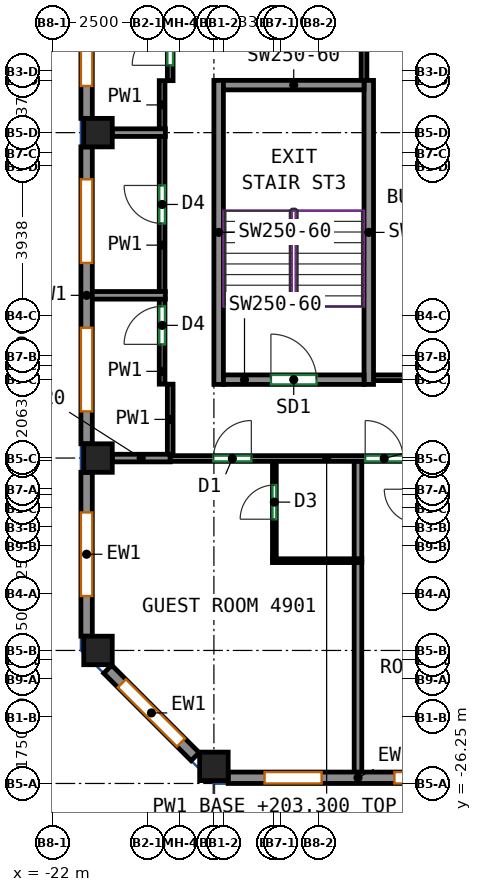
"""IFC4 building model, lengths in metres.
Left out: names, types, materials, properties, quantities, classifications, styles, units other than length and angle.
Written with IfcOpenShell. Run it as: python <this file> out.ifc"""

import sys

from ifc_helpers import new_model, si_unit, direction, frame, frame_2d, origin, origin_2d, place, context, subcontext, project, spatial, rectangle, extrude, source, transform, mapped, element, fill, save


model = new_model("IFC4")
c1 = context("Model", 3, precision=1e-05, world=origin(), true_north=direction((0.0, 1.0)))
c2 = subcontext(c1, "Body", "Model", "MODEL_VIEW")
j1 = project(units=[si_unit("LENGTHUNIT", "METRE"), si_unit("PLANEANGLEUNIT", "RADIAN")], contexts=[c1])
p1 = place(None, origin())
s1 = spatial("IfcSite", under=j1, at=p1, CompositionType="ELEMENT")
p2 = place(p1, origin())
s2 = spatial("IfcBuilding", under=s1, at=p2, CompositionType="ELEMENT")
p3 = place(p2, frame((0.0, 0.0, 203.3)))
s3 = spatial("IfcBuildingStorey", under=s2, at=p3, CompositionType="ELEMENT", Elevation=203.3)
m1 = source(origin(), c2, "Body", "SweptSolid", [
    extrude(rectangle(XDim=0.75, YDim=0.75, at=origin_2d()), origin(), (0.0, 0.0, 1.0), 3.12),
])
for number, where, z_axis, x_axis in (
    (1, (-20.8, -22.75, 0.0), (0.0, 0.0, 1.0), (1.0, 0.0, 0.0)),
    (2, (-20.8, -17.688, 0.0), (0.0, 0.0, 1.0), (1.0, 0.0, 0.0)),
    (3, (-20.8, -9.125, 0.0), (0.0, 0.0, 1.0), (1.0, 0.0, 0.0)),
    (4, (-17.75, -25.8, 0.0), (0.0, 0.0, 1.0), (1.0, 0.0, 0.0)),
):
    element("IfcColumn", number, at=place(p3, frame(where, z_axis=z_axis, x_axis=x_axis)), inside=s3, PredefinedType="COLUMN", context=c2, shape_type="MappedRepresentation", body=[
        mapped(m1, transform((0.0, 0.0, 0.0))),
    ])
m2 = source(origin(), c2, "Body", "SweptSolid", [
    extrude(rectangle(XDim=8.0, YDim=0.25, at=frame_2d((4.0, 0.0))), origin(), (0.0, 0.0, 1.0), 3.12),
])
for number, where, z_axis, x_axis in (
    (5, (-17.625, -15.75, 0.0), (0.0, 0.0, 1.0), (0.0, 1.0, 0.0)),
    (6, (-13.675, -15.75, 0.0), (0.0, 0.0, 1.0), (0.0, 1.0, 0.0)),
):
    element("IfcWall", number, at=place(p3, frame(where, z_axis=z_axis, x_axis=x_axis)), inside=s3, PredefinedType="SHEAR", context=c2, shape_type="MappedRepresentation", body=[
        mapped(m2, transform((0.0, 0.0, 0.0))),
    ])
m3 = source(origin(), c2, "Body", "SweptSolid", [
    extrude(rectangle(XDim=3.7, YDim=0.25, at=frame_2d((1.85, 0.0))), origin(), (0.0, 0.0, 1.0), 3.12),
])
p4 = place(p3, frame((-17.5, -15.625, 0.0), z_axis=(0.0, 0.0, 1.0), x_axis=(1.0, 0.0, 0.0)))
e7 = element("IfcWall", 7, at=p4, inside=s3, PredefinedType="SHEAR", context=c2, shape_type="MappedRepresentation", body=[
    mapped(m3, transform((0.0, 0.0, 0.0))),
])
p5 = place(p4, frame((1.25, 0.0, 0.0)))
e8 = element("IfcOpeningElement", 8, at=p5, cuts=e7, PredefinedType="OPENING", context=c2, shape_type="SweptSolid", body=[
    extrude(rectangle(XDim=1.2, YDim=2.1, at=frame_2d((0.6, 1.05))), frame((0.0, 0.135, 0.0), z_axis=(0.0, -1.0, 0.0), x_axis=(1.0, 0.0, 0.0)), (0.0, 0.0, 1.0), 0.27),
])
p6 = place(p3, frame((-17.5, -7.875, 0.0), z_axis=(0.0, 0.0, 1.0), x_axis=(1.0, 0.0, 0.0)))
e9 = element("IfcWall", 9, at=p6, inside=s3, PredefinedType="SHEAR", context=c2, shape_type="MappedRepresentation", body=[
    mapped(m3, transform((0.0, 0.0, 0.0))),
])
m4 = source(origin(), c2, "Body", "SweptSolid", [
    extrude(rectangle(XDim=6.833, YDim=0.3, at=frame_2d((3.417, 0.0))), origin(), (0.0, 0.0, 1.0), 3.12),
])
p7 = place(p3, frame((-17.375, -26.1, 0.0), z_axis=(0.0, 0.0, 1.0), x_axis=(1.0, 0.0, 0.0)))
e10 = element("IfcWall", 10, at=p7, inside=s3, PredefinedType="SOLIDWALL", context=c2, shape_type="MappedRepresentation", body=[
    mapped(m4, transform((0.0, 0.0, 0.0))),
])
p8 = place(p7, frame((0.958, 0.0, 0.85)))
e11 = element("IfcOpeningElement", 11, at=p8, cuts=e10, PredefinedType="OPENING", context=c2, shape_type="SweptSolid", body=[
    extrude(rectangle(XDim=1.5, YDim=1.95, at=frame_2d((0.75, 0.975))), frame((0.0, 0.16, 0.0), z_axis=(0.0, -1.0, 0.0), x_axis=(1.0, 0.0, 0.0)), (0.0, 0.0, 1.0), 0.32),
])
p9 = place(p7, frame((4.375, 0.0, 0.85)))
e12 = element("IfcOpeningElement", 12, at=p9, cuts=e10, PredefinedType="OPENING", context=c2, shape_type="SweptSolid", body=[
    extrude(rectangle(XDim=1.5, YDim=1.95, at=frame_2d((0.75, 0.975))), frame((0.0, 0.16, 0.0), z_axis=(0.0, -1.0, 0.0), x_axis=(1.0, 0.0, 0.0)), (0.0, 0.0, 1.0), 0.32),
])
m5 = source(origin(), c2, "Body", "SweptSolid", [
    extrude(rectangle(XDim=7.812, YDim=0.3, at=frame_2d((3.906, 0.0))), origin(), (0.0, 0.0, 1.0), 3.12),
])
p10 = place(p3, frame((-21.1, -0.938, 0.0), z_axis=(0.0, 0.0, 1.0), x_axis=(0.0, -1.0, 0.0)))
e13 = element("IfcWall", 13, at=p10, inside=s3, PredefinedType="SOLIDWALL", context=c2, shape_type="MappedRepresentation", body=[
    mapped(m5, transform((0.0, 0.0, 0.0))),
])
p11 = place(p10, frame((0.853, 0.0, 0.85)))
e14 = element("IfcOpeningElement", 14, at=p11, cuts=e13, PredefinedType="OPENING", context=c2, shape_type="SweptSolid", body=[
    extrude(rectangle(XDim=2.2, YDim=1.95, at=frame_2d((1.1, 0.975))), frame((0.0, 0.16, 0.0), z_axis=(0.0, -1.0, 0.0), x_axis=(1.0, 0.0, 0.0)), (0.0, 0.0, 1.0), 0.32),
])
p12 = place(p10, frame((4.76, 0.0, 0.85)))
e15 = element("IfcOpeningElement", 15, at=p12, cuts=e13, PredefinedType="OPENING", context=c2, shape_type="SweptSolid", body=[
    extrude(rectangle(XDim=2.2, YDim=1.95, at=frame_2d((1.1, 0.975))), frame((0.0, 0.16, 0.0), z_axis=(0.0, -1.0, 0.0), x_axis=(1.0, 0.0, 0.0)), (0.0, 0.0, 1.0), 0.32),
])
p13 = place(p3, frame((-21.1, -9.5, 0.0), z_axis=(0.0, 0.0, 1.0), x_axis=(0.0, -1.0, 0.0)))
e16 = element("IfcWall", 16, at=p13, inside=s3, PredefinedType="SOLIDWALL", context=c2, shape_type="MappedRepresentation", body=[
    mapped(m5, transform((0.0, 0.0, 0.0))),
])
p14 = place(p13, frame((0.853, 0.0, 0.85)))
e17 = element("IfcOpeningElement", 17, at=p14, cuts=e16, PredefinedType="OPENING", context=c2, shape_type="SweptSolid", body=[
    extrude(rectangle(XDim=2.2, YDim=1.95, at=frame_2d((1.1, 0.975))), frame((0.0, 0.16, 0.0), z_axis=(0.0, -1.0, 0.0), x_axis=(1.0, 0.0, 0.0)), (0.0, 0.0, 1.0), 0.32),
])
p15 = place(p13, frame((4.759, 0.0, 0.85)))
e18 = element("IfcOpeningElement", 18, at=p15, cuts=e16, PredefinedType="OPENING", context=c2, shape_type="SweptSolid", body=[
    extrude(rectangle(XDim=2.2, YDim=1.95, at=frame_2d((1.1, 0.975))), frame((0.0, 0.16, 0.0), z_axis=(0.0, -1.0, 0.0), x_axis=(1.0, 0.0, 0.0)), (0.0, 0.0, 1.0), 0.32),
])
m6 = source(origin(), c2, "Body", "SweptSolid", [
    extrude(rectangle(XDim=4.312, YDim=0.3, at=frame_2d((2.156, 0.0))), origin(), (0.0, 0.0, 1.0), 3.12),
])
p16 = place(p3, frame((-21.1, -18.062, 0.0), z_axis=(0.0, 0.0, 1.0), x_axis=(0.0, -1.0, 0.0)))
e19 = element("IfcWall", 19, at=p16, inside=s3, PredefinedType="SOLIDWALL", context=c2, shape_type="MappedRepresentation", body=[
    mapped(m6, transform((0.0, 0.0, 0.0))),
])
p17 = place(p16, frame((1.056, 0.0, 0.85)))
e20 = element("IfcOpeningElement", 20, at=p17, cuts=e19, PredefinedType="OPENING", context=c2, shape_type="SweptSolid", body=[
    extrude(rectangle(XDim=2.2, YDim=1.95, at=frame_2d((1.1, 0.975))), frame((0.0, 0.16, 0.0), z_axis=(0.0, -1.0, 0.0), x_axis=(1.0, 0.0, 0.0)), (0.0, 0.0, 1.0), 0.32),
])
m7 = source(origin(), c2, "Body", "SweptSolid", [
    extrude(rectangle(XDim=3.253, YDim=0.3, at=frame_2d((1.626, 0.0))), origin(), (0.0, 0.0, 1.0), 3.12),
])
p18 = place(p3, frame((-20.544, -23.244, 0.0), z_axis=(0.0, 0.0, 1.0), x_axis=(0.707106781187, -0.707106781187, 0.0)))
e21 = element("IfcWall", 21, at=p18, inside=s3, PredefinedType="SOLIDWALL", context=c2, shape_type="MappedRepresentation", body=[
    mapped(m7, transform((0.0, 0.0, 0.0))),
])
p19 = place(p18, frame((0.526, 0.0, 0.85)))
e22 = element("IfcOpeningElement", 22, at=p19, cuts=e21, PredefinedType="OPENING", context=c2, shape_type="SweptSolid", body=[
    extrude(rectangle(XDim=2.2, YDim=1.95, at=frame_2d((1.1, 0.975))), frame((0.0, 0.16, 0.0), z_axis=(0.0, -1.0, 0.0), x_axis=(1.0, 0.0, 0.0)), (0.0, 0.0, 1.0), 0.32),
])
p20 = place(p3, frame((-18.9, -17.7, 0.0), z_axis=(0.0, 0.0, 1.0), x_axis=(1.0, 0.0, 0.0)))
e23 = element("IfcWall", 23, at=p20, inside=s3, PredefinedType="PARTITIONING", context=c2, shape_type="SweptSolid", body=[
    extrude(rectangle(XDim=8.233, YDim=0.15, at=frame_2d((4.116, 0.0))), origin(), (0.0, 0.0, 1.0), 2.52),
])
p21 = place(p20, frame((1.135, 0.0, 0.0)))
e24 = element("IfcOpeningElement", 24, at=p21, cuts=e23, PredefinedType="OPENING", context=c2, shape_type="SweptSolid", body=[
    extrude(rectangle(XDim=1.0, YDim=2.1, at=frame_2d((0.5, 1.05))), frame((0.0, 0.085, 0.0), z_axis=(0.0, -1.0, 0.0), x_axis=(1.0, 0.0, 0.0)), (0.0, 0.0, 1.0), 0.17),
])
p22 = place(p20, frame((5.131, 0.0, 0.0)))
e25 = element("IfcOpeningElement", 25, at=p22, cuts=e23, PredefinedType="OPENING", context=c2, shape_type="SweptSolid", body=[
    extrude(rectangle(XDim=1.0, YDim=2.1, at=frame_2d((0.5, 1.05))), frame((0.0, 0.085, 0.0), z_axis=(0.0, -1.0, 0.0), x_axis=(1.0, 0.0, 0.0)), (0.0, 0.0, 1.0), 0.17),
])
p23 = place(p3, frame((-18.9, -17.598, 0.0), z_axis=(0.0, 0.0, 1.0), x_axis=(0.0, 1.0, 0.0)))
e26 = element("IfcWall", 26, at=p23, inside=s3, PredefinedType="PARTITIONING", context=c2, shape_type="SweptSolid", body=[
    extrude(rectangle(XDim=1.855, YDim=0.15, at=frame_2d((0.927, 0.0))), origin(), (0.0, 0.0, 1.0), 3.12),
])
p24 = place(p3, frame((-19.113, -15.743, 0.0), z_axis=(0.0, 0.0, 1.0), x_axis=(0.0, 1.0, 0.0)))
e27 = element("IfcWall", 27, at=p24, inside=s3, PredefinedType="PARTITIONING", context=c2, shape_type="SweptSolid", body=[
    extrude(rectangle(XDim=2.247, YDim=0.15, at=frame_2d((1.124, 0.0))), origin(), (0.0, 0.0, 1.0), 3.12),
])
p25 = place(p24, frame((1.047, 0.0, 0.0)))
e28 = element("IfcOpeningElement", 28, at=p25, cuts=e27, PredefinedType="OPENING", context=c2, shape_type="SweptSolid", body=[
    extrude(rectangle(XDim=1.0, YDim=2.1, at=frame_2d((0.5, 1.05))), frame((0.0, 0.085, 0.0), z_axis=(0.0, -1.0, 0.0), x_axis=(1.0, 0.0, 0.0)), (0.0, 0.0, 1.0), 0.17),
])
p26 = place(p3, frame((-19.113, -13.316, 0.0), z_axis=(0.0, 0.0, 1.0), x_axis=(0.0, 1.0, 0.0)))
e29 = element("IfcWall", 29, at=p26, inside=s3, PredefinedType="PARTITIONING", context=c2, shape_type="SweptSolid", body=[
    extrude(rectangle(XDim=4.101, YDim=0.15, at=frame_2d((2.05, 0.0))), origin(), (0.0, 0.0, 1.0), 3.12),
])
p27 = place(p26, frame((1.801, 0.0, 0.0)))
e30 = element("IfcOpeningElement", 30, at=p27, cuts=e29, PredefinedType="OPENING", context=c2, shape_type="SweptSolid", body=[
    extrude(rectangle(XDim=1.0, YDim=2.1, at=frame_2d((0.5, 1.05))), frame((0.0, 0.085, 0.0), z_axis=(0.0, -1.0, 0.0), x_axis=(1.0, 0.0, 0.0)), (0.0, 0.0, 1.0), 0.17),
])
p28 = place(p3, frame((-18.9, -7.757, 0.0), z_axis=(0.0, 0.0, 1.0), x_axis=(0.0, 1.0, 0.0)))
e31 = element("IfcWall", 31, at=p28, inside=s3, PredefinedType="PARTITIONING", context=c2, shape_type="SweptSolid", body=[
    extrude(rectangle(XDim=2.824, YDim=0.15, at=frame_2d((1.412, 0.0))), origin(), (0.0, 0.0, 1.0), 3.12),
])
p29 = place(p28, frame((0.403, 0.0, 0.0)))
e32 = element("IfcOpeningElement", 32, at=p29, cuts=e31, PredefinedType="OPENING", context=c2, shape_type="SweptSolid", body=[
    extrude(rectangle(XDim=1.0, YDim=2.1, at=frame_2d((0.5, 1.05))), frame((0.0, 0.085, 0.0), z_axis=(0.0, -1.0, 0.0), x_axis=(1.0, 0.0, 0.0)), (0.0, 0.0, 1.0), 0.17),
])
p30 = place(p3, frame((-19.113, -9.035, 0.0), z_axis=(0.0, 0.0, 1.0), x_axis=(0.0, 1.0, 0.0)))
e33 = element("IfcWall", 33, at=p30, inside=s3, PredefinedType="PARTITIONING", context=c2, shape_type="SweptSolid", body=[
    extrude(rectangle(XDim=1.278, YDim=0.15, at=frame_2d((0.639, 0.0))), origin(), (0.0, 0.0, 1.0), 3.12),
])
p31 = place(p3, frame((-13.8, -7.75, 0.0), z_axis=(0.0, 0.0, 1.0), x_axis=(0.0, 1.0, 0.0)))
e34 = element("IfcWall", 34, at=p31, inside=s3, PredefinedType="PARTITIONING", context=c2, shape_type="SweptSolid", body=[
    extrude(rectangle(XDim=2.817, YDim=0.15, at=frame_2d((1.408, 0.0))), origin(), (0.0, 0.0, 1.0), 3.12),
])
p32 = place(p3, frame((-6.365, -15.575, 0.0), z_axis=(0.0, 0.0, 1.0), x_axis=(-1.0, 0.0, 0.0)))
e35 = element("IfcWall", 35, at=p32, inside=s3, PredefinedType="PARTITIONING", context=c2, shape_type="SweptSolid", body=[
    extrude(rectangle(XDim=7.185, YDim=0.15, at=frame_2d((3.593, 0.0))), origin(), (0.0, 0.0, 1.0), 3.12),
])
p33 = place(p32, frame((3.143, 0.0, 0.0)))
e36 = element("IfcOpeningElement", 36, at=p33, cuts=e35, PredefinedType="OPENING", context=c2, shape_type="SweptSolid", body=[
    extrude(rectangle(XDim=0.9, YDim=2.1, at=frame_2d((0.45, 1.05))), frame((0.0, 0.085, 0.0), z_axis=(0.0, -1.0, 0.0), x_axis=(1.0, 0.0, 0.0)), (0.0, 0.0, 1.0), 0.17),
])
p34 = place(p3, frame((-16.159, -20.338, 0.0), z_axis=(0.0, 0.0, 1.0), x_axis=(0.0, 1.0, 0.0)))
e37 = element("IfcWall", 37, at=p34, inside=s3, PredefinedType="PARTITIONING", context=c2, shape_type="SweptSolid", body=[
    extrude(rectangle(XDim=2.561, YDim=0.1, at=frame_2d((1.28, 0.0))), origin(), (0.0, 0.0, 1.0), 3.12),
])
p35 = place(p34, frame((1.041, 0.0, 0.0)))
e38 = element("IfcOpeningElement", 38, at=p35, cuts=e37, PredefinedType="OPENING", context=c2, shape_type="SweptSolid", body=[
    extrude(rectangle(XDim=0.9, YDim=2.1, at=frame_2d((0.45, 1.05))), frame((0.0, 0.06, 0.0), z_axis=(0.0, -1.0, 0.0), x_axis=(1.0, 0.0, 0.0)), (0.0, 0.0, 1.0), 0.12),
])
p36 = place(p3, frame((-16.209, -20.388, 0.0), z_axis=(0.0, 0.0, 1.0), x_axis=(1.0, 0.0, 0.0)))
e39 = element("IfcWall", 39, at=p36, inside=s3, PredefinedType="PARTITIONING", context=c2, shape_type="SweptSolid", body=[
    extrude(rectangle(XDim=2.35, YDim=0.1, at=frame_2d((1.175, 0.0))), origin(), (0.0, 0.0, 1.0), 3.12),
])
p37 = place(p3, frame((-13.959, -26.0, 0.0), z_axis=(0.0, 0.0, 1.0), x_axis=(0.0, 1.0, 0.0)))
e40 = element("IfcWall", 40, at=p37, inside=s3, PredefinedType="PARTITIONING", context=c2, shape_type="SweptSolid", body=[
    extrude(rectangle(XDim=5.562, YDim=0.2, at=frame_2d((2.781, 0.0))), origin(), (0.0, 0.0, 1.0), 3.12),
])
p38 = place(p3, frame((-20.425, -17.688, 0.0), z_axis=(0.0, 0.0, 1.0), x_axis=(1.0, 0.0, 0.0)))
e41 = element("IfcWall", 41, at=p38, inside=s3, PredefinedType="PARTITIONING", context=c2, shape_type="SweptSolid", body=[
    extrude(rectangle(XDim=1.523, YDim=0.2, at=frame_2d((0.761, 0.0))), origin(), (0.0, 0.0, 1.0), 2.52),
])
p39 = place(p3, frame((-13.959, -20.338, 0.0), z_axis=(0.0, 0.0, 1.0), x_axis=(0.0, 1.0, 0.0)))
e42 = element("IfcWall", 42, at=p39, inside=s3, PredefinedType="PARTITIONING", context=c2, shape_type="SweptSolid", body=[
    extrude(rectangle(XDim=2.561, YDim=0.2, at=frame_2d((1.28, 0.0))), origin(), (0.0, 0.0, 1.0), 3.12),
])
p40 = place(p3, frame((-19.027, -13.406, 0.0), z_axis=(0.0, 0.0, 1.0), x_axis=(-1.0, 0.0, 0.0)))
e43 = element("IfcWall", 43, at=p40, inside=s3, PredefinedType="PARTITIONING", context=c2, shape_type="SweptSolid", body=[
    extrude(rectangle(XDim=1.973, YDim=0.2, at=frame_2d((0.986, 0.0))), origin(), (0.0, 0.0, 1.0), 3.12),
])
p41 = place(p3, frame((-20.425, -9.125, 0.0), z_axis=(0.0, 0.0, 1.0), x_axis=(1.0, 0.0, 0.0)))
e44 = element("IfcWall", 44, at=p41, inside=s3, PredefinedType="PARTITIONING", context=c2, shape_type="SweptSolid", body=[
    extrude(rectangle(XDim=1.398, YDim=0.2, at=frame_2d((0.699, 0.0))), origin(), (0.0, 0.0, 1.0), 3.12),
])
p42 = place(p8, origin())
e45 = element("IfcWindow", 45, at=p42, inside=s3, PartitioningType="SINGLE_PANEL", PredefinedType="WINDOW", context=c2, shape_type="SweptSolid", body=[
    extrude(rectangle(XDim=1.5, YDim=1.95, at=frame_2d((0.75, 0.975))), frame((0.0, 0.03, 0.0), z_axis=(0.0, -1.0, 0.0), x_axis=(1.0, 0.0, 0.0)), (0.0, 0.0, 1.0), 0.06),
])
fill(e11, e45)
p43 = place(p9, origin())
e46 = element("IfcWindow", 46, at=p43, inside=s3, PartitioningType="SINGLE_PANEL", PredefinedType="WINDOW", context=c2, shape_type="SweptSolid", body=[
    extrude(rectangle(XDim=1.5, YDim=1.95, at=frame_2d((0.75, 0.975))), frame((0.0, 0.03, 0.0), z_axis=(0.0, -1.0, 0.0), x_axis=(1.0, 0.0, 0.0)), (0.0, 0.0, 1.0), 0.06),
])
fill(e12, e46)
p44 = place(p12, origin())
e47 = element("IfcWindow", 47, at=p44, inside=s3, PartitioningType="SINGLE_PANEL", PredefinedType="WINDOW", context=c2, shape_type="SweptSolid", body=[
    extrude(rectangle(XDim=2.2, YDim=1.95, at=frame_2d((1.1, 0.975))), frame((0.0, 0.03, 0.0), z_axis=(0.0, -1.0, 0.0), x_axis=(1.0, 0.0, 0.0)), (0.0, 0.0, 1.0), 0.06),
])
fill(e15, e47)
p45 = place(p14, origin())
e48 = element("IfcWindow", 48, at=p45, inside=s3, PartitioningType="SINGLE_PANEL", PredefinedType="WINDOW", context=c2, shape_type="SweptSolid", body=[
    extrude(rectangle(XDim=2.2, YDim=1.95, at=frame_2d((1.1, 0.975))), frame((0.0, 0.03, 0.0), z_axis=(0.0, -1.0, 0.0), x_axis=(1.0, 0.0, 0.0)), (0.0, 0.0, 1.0), 0.06),
])
fill(e17, e48)
p46 = place(p15, origin())
e49 = element("IfcWindow", 49, at=p46, inside=s3, PartitioningType="SINGLE_PANEL", PredefinedType="WINDOW", context=c2, shape_type="SweptSolid", body=[
    extrude(rectangle(XDim=2.2, YDim=1.95, at=frame_2d((1.1, 0.975))), frame((0.0, 0.03, 0.0), z_axis=(0.0, -1.0, 0.0), x_axis=(1.0, 0.0, 0.0)), (0.0, 0.0, 1.0), 0.06),
])
fill(e18, e49)
p47 = place(p17, origin())
e50 = element("IfcWindow", 50, at=p47, inside=s3, PartitioningType="SINGLE_PANEL", PredefinedType="WINDOW", context=c2, shape_type="SweptSolid", body=[
    extrude(rectangle(XDim=2.2, YDim=1.95, at=frame_2d((1.1, 0.975))), frame((0.0, 0.03, 0.0), z_axis=(0.0, -1.0, 0.0), x_axis=(1.0, 0.0, 0.0)), (0.0, 0.0, 1.0), 0.06),
])
fill(e20, e50)
p48 = place(p19, origin())
e51 = element("IfcWindow", 51, at=p48, inside=s3, PartitioningType="SINGLE_PANEL", PredefinedType="WINDOW", context=c2, shape_type="SweptSolid", body=[
    extrude(rectangle(XDim=2.2, YDim=1.95, at=frame_2d((1.1, 0.975))), frame((0.0, 0.03, 0.0), z_axis=(0.0, -1.0, 0.0), x_axis=(1.0, 0.0, 0.0)), (0.0, 0.0, 1.0), 0.06),
])
fill(e22, e51)
p49 = place(p5, origin())
e52 = element("IfcDoor", 52, at=p49, inside=s3, OperationType="DOUBLE_DOOR_SINGLE_SWING", PredefinedType="DOOR", context=c2, shape_type="SweptSolid", body=[
    extrude(rectangle(XDim=1.2, YDim=2.1, at=frame_2d((0.6, 1.05))), frame((0.0, 0.025, 0.0), z_axis=(0.0, -1.0, 0.0), x_axis=(1.0, 0.0, 0.0)), (0.0, 0.0, 1.0), 0.05),
])
fill(e8, e52)
p50 = place(p35, origin())
e53 = element("IfcDoor", 53, at=p50, inside=s3, OperationType="SINGLE_SWING_LEFT", PredefinedType="DOOR", context=c2, shape_type="SweptSolid", body=[
    extrude(rectangle(XDim=0.9, YDim=2.1, at=frame_2d((0.45, 1.05))), frame((0.0, 0.025, 0.0), z_axis=(0.0, -1.0, 0.0), x_axis=(1.0, 0.0, 0.0)), (0.0, 0.0, 1.0), 0.05),
])
fill(e38, e53)
p51 = place(p21, origin())
e54 = element("IfcDoor", 54, at=p51, inside=s3, OperationType="SINGLE_SWING_RIGHT", PredefinedType="DOOR", context=c2, shape_type="SweptSolid", body=[
    extrude(rectangle(XDim=1.0, YDim=2.1, at=frame_2d((0.5, 1.05))), frame((0.0, 0.025, 0.0), z_axis=(0.0, -1.0, 0.0), x_axis=(1.0, 0.0, 0.0)), (0.0, 0.0, 1.0), 0.05),
])
fill(e24, e54)
p52 = place(p22, origin())
e55 = element("IfcDoor", 55, at=p52, inside=s3, OperationType="SINGLE_SWING_LEFT", PredefinedType="DOOR", context=c2, shape_type="SweptSolid", body=[
    extrude(rectangle(XDim=1.0, YDim=2.1, at=frame_2d((0.5, 1.05))), frame((0.0, 0.025, 0.0), z_axis=(0.0, -1.0, 0.0), x_axis=(1.0, 0.0, 0.0)), (0.0, 0.0, 1.0), 0.05),
])
fill(e25, e55)
p53 = place(p25, origin())
e56 = element("IfcDoor", 56, at=p53, inside=s3, OperationType="SINGLE_SWING_LEFT", PredefinedType="DOOR", context=c2, shape_type="SweptSolid", body=[
    extrude(rectangle(XDim=1.0, YDim=2.1, at=frame_2d((0.5, 1.05))), frame((0.0, 0.025, 0.0), z_axis=(0.0, -1.0, 0.0), x_axis=(1.0, 0.0, 0.0)), (0.0, 0.0, 1.0), 0.05),
])
fill(e28, e56)
p54 = place(p27, origin())
e57 = element("IfcDoor", 57, at=p54, inside=s3, OperationType="SINGLE_SWING_RIGHT", PredefinedType="DOOR", context=c2, shape_type="SweptSolid", body=[
    extrude(rectangle(XDim=1.0, YDim=2.1, at=frame_2d((0.5, 1.05))), frame((0.0, 0.025, 0.0), z_axis=(0.0, -1.0, 0.0), x_axis=(1.0, 0.0, 0.0)), (0.0, 0.0, 1.0), 0.05),
])
fill(e30, e57)
p55 = place(p29, origin())
e58 = element("IfcDoor", 58, at=p55, inside=s3, OperationType="SINGLE_SWING_LEFT", PredefinedType="DOOR", context=c2, shape_type="SweptSolid", body=[
    extrude(rectangle(XDim=1.0, YDim=2.1, at=frame_2d((0.5, 1.05))), frame((0.0, 0.025, 0.0), z_axis=(0.0, -1.0, 0.0), x_axis=(1.0, 0.0, 0.0)), (0.0, 0.0, 1.0), 0.05),
])
fill(e32, e58)
save(model, sys.argv[1])
